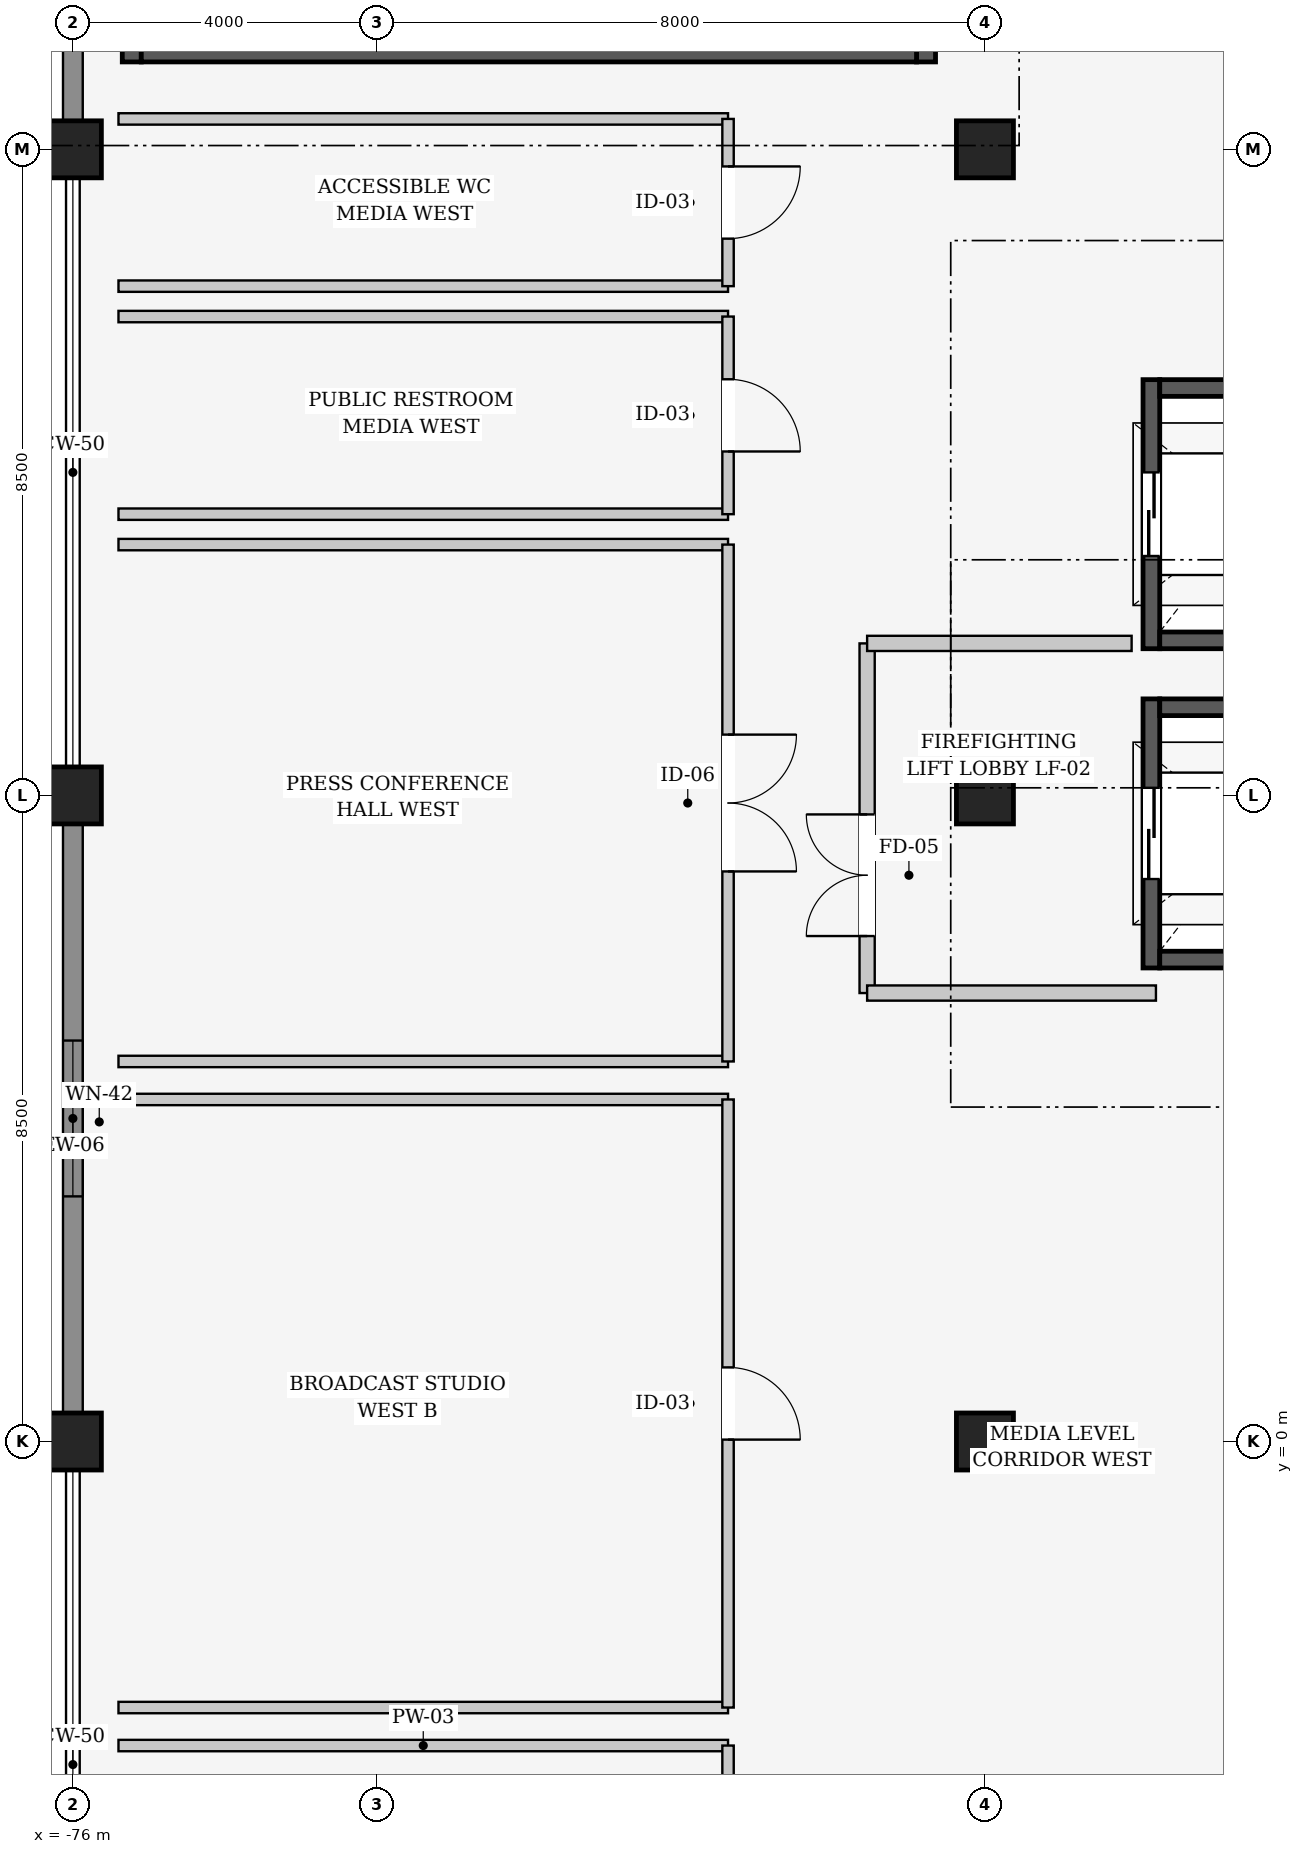
"""IFC4 building model, lengths in metres.
Left out: names, types, materials, properties, quantities, classifications, styles, units other than length and angle.
Written with IfcOpenShell. Run it as: python <this file> out.ifc"""

import sys

from ifc_helpers import new_model, si_unit, direction, frame, frame_2d, origin, origin_2d, place, context, subcontext, project, spatial, rectangle, extrude, element, fill, save


model = new_model("IFC4")
c1 = context("Model", 3, precision=1e-05, world=origin(), true_north=direction((0.0, 1.0)))
c2 = subcontext(c1, "Body", "Model", "MODEL_VIEW")
j1 = project(units=[si_unit("LENGTHUNIT", "METRE"), si_unit("PLANEANGLEUNIT", "RADIAN")], contexts=[c1])
p1 = place(None, origin())
s1 = spatial("IfcSite", under=j1, at=p1, CompositionType="ELEMENT")
p2 = place(p1, origin())
s2 = spatial("IfcBuilding", under=s1, at=p2, CompositionType="ELEMENT")
p3 = place(p2, frame((0.0, 0.0, 26.4)))
s3 = spatial("IfcBuildingStorey", under=s2, at=p3, CompositionType="ELEMENT", Elevation=26.4)
for number, where, z_axis, x_axis in (
    (1, (-76.0, 0.0, 0.0), (0.0, 0.0, 1.0), (1.0, 0.0, 0.0)),
    (2, (-76.0, 8.5, 0.0), (0.0, 0.0, 1.0), (1.0, 0.0, 0.0)),
    (3, (-76.0, 17.0, 0.0), (0.0, 0.0, 1.0), (1.0, 0.0, 0.0)),
    (4, (-64.0, 0.0, 0.0), (0.0, 0.0, 1.0), (1.0, 0.0, 0.0)),
    (5, (-64.0, 8.5, 0.0), (0.0, 0.0, 1.0), (1.0, 0.0, 0.0)),
    (6, (-64.0, 17.0, 0.0), (0.0, 0.0, 1.0), (1.0, 0.0, 0.0)),
):
    element("IfcColumn", number, at=place(p3, frame(where, z_axis=z_axis, x_axis=x_axis)), inside=s3, PredefinedType="COLUMN", context=c2, shape_type="SweptSolid", body=[
        extrude(rectangle(XDim=0.75, YDim=0.75, at=origin_2d()), origin(), (0.0, 0.0, 1.0), 5.4),
    ])
p4 = place(p3, frame((-76.0, 0.357, 0.0), z_axis=(0.0, 0.0, 1.0), x_axis=(0.0, 1.0, 0.0)))
e7 = element("IfcWall", 7, at=p4, inside=s3, PredefinedType="SOLIDWALL", context=c2, shape_type="SweptSolid", body=[
    extrude(rectangle(XDim=7.786, YDim=0.26, at=frame_2d((3.893, 0.0))), origin(), (0.0, 0.0, 1.0), 4.22),
])
p5 = place(p4, frame((2.868, 0.0, 0.95)))
e8 = element("IfcOpeningElement", 8, at=p5, cuts=e7, PredefinedType="OPENING", context=c2, shape_type="SweptSolid", body=[
    extrude(rectangle(XDim=2.05, YDim=2.25, at=frame_2d((1.025, 1.125))), frame((0.0, 0.14, 0.0), z_axis=(0.0, -1.0, 0.0), x_axis=(1.0, 0.0, 0.0)), (0.0, 0.0, 1.0), 0.28),
])
p6 = place(p3, frame((-76.0, 17.357, 0.0), z_axis=(0.0, 0.0, 1.0), x_axis=(0.0, 1.0, 0.0)))
e9 = element("IfcWall", 9, at=p6, inside=s3, PredefinedType="SOLIDWALL", context=c2, shape_type="SweptSolid", body=[
    extrude(rectangle(XDim=7.286, YDim=0.26, at=frame_2d((3.643, 0.0))), origin(), (0.0, 0.0, 1.0), 4.22),
])
p7 = place(p6, frame((2.518, 0.0, 0.95)))
e10 = element("IfcOpeningElement", 10, at=p7, cuts=e9, PredefinedType="OPENING", context=c2, shape_type="SweptSolid", body=[
    extrude(rectangle(XDim=2.25, YDim=2.25, at=frame_2d((1.125, 1.125))), frame((0.0, 0.14, 0.0), z_axis=(0.0, -1.0, 0.0), x_axis=(1.0, 0.0, 0.0)), (0.0, 0.0, 1.0), 0.28),
])
p8 = place(p3, frame((-75.225, 18.15, 0.0), z_axis=(0.0, 0.0, 1.0), x_axis=(0.0, 1.0, 0.0)))
e11 = element("IfcWall", 11, at=p8, inside=s3, PredefinedType="SHEAR", context=c2, shape_type="SweptSolid", body=[
    extrude(rectangle(XDim=5.7, YDim=0.25, at=frame_2d((2.85, 0.0))), origin(), (0.0, 0.0, 1.0), 3.6),
])
p9 = place(p3, frame((-64.775, 23.85, 0.0), z_axis=(0.0, 0.0, 1.0), x_axis=(0.0, -1.0, 0.0)))
e12 = element("IfcWall", 12, at=p9, inside=s3, PredefinedType="SHEAR", context=c2, shape_type="SweptSolid", body=[
    extrude(rectangle(XDim=5.7, YDim=0.25, at=frame_2d((2.85, 0.0))), origin(), (0.0, 0.0, 1.0), 3.6),
])
p10 = place(p9, frame((2.1, 0.0, 0.0)))
e13 = element("IfcOpeningElement", 13, at=p10, cuts=e12, PredefinedType="OPENING", context=c2, shape_type="SweptSolid", body=[
    extrude(rectangle(XDim=1.5, YDim=2.2, at=frame_2d((0.75, 1.1))), frame((0.0, 0.135, 0.0), z_axis=(0.0, -1.0, 0.0), x_axis=(1.0, 0.0, 0.0)), (0.0, 0.0, 1.0), 0.27),
])
p11 = place(p3, frame((-64.9, 18.275, 0.0), z_axis=(0.0, 0.0, 1.0), x_axis=(-1.0, 0.0, 0.0)))
e14 = element("IfcWall", 14, at=p11, inside=s3, PredefinedType="SHEAR", context=c2, shape_type="SweptSolid", body=[
    extrude(rectangle(XDim=10.2, YDim=0.25, at=frame_2d((5.1, 0.0))), origin(), (0.0, 0.0, 1.0), 3.6),
])
p12 = place(p3, frame((-61.81, 6.23, 0.0), z_axis=(0.0, 0.0, 1.0), x_axis=(0.0, 1.0, 0.0)))
e15 = element("IfcWall", 15, at=p12, inside=s3, PredefinedType="SHEAR", context=c2, shape_type="SweptSolid", body=[
    extrude(rectangle(XDim=3.54, YDim=0.22, at=frame_2d((1.77, 0.0))), origin(), (0.0, 0.0, 1.0), 6.8),
])
p13 = place(p12, frame((1.17, 0.0, 0.0)))
e16 = element("IfcOpeningElement", 16, at=p13, cuts=e15, PredefinedType="OPENING", context=c2, shape_type="SweptSolid", body=[
    extrude(rectangle(XDim=1.2, YDim=2.2, at=frame_2d((0.6, 1.1))), frame((0.0, 0.12, 0.0), z_axis=(0.0, -1.0, 0.0), x_axis=(1.0, 0.0, 0.0)), (0.0, 0.0, 1.0), 0.24),
])
for number, where, z_axis, x_axis in (
    (17, (-61.7, 9.66, 0.0), (0.0, 0.0, 1.0), (1.0, 0.0, 0.0)),
    (18, (-59.3, 6.34, 0.0), (0.0, 0.0, 1.0), (-1.0, 0.0, 0.0)),
):
    element("IfcWall", number, at=place(p3, frame(where, z_axis=z_axis, x_axis=x_axis)), inside=s3, PredefinedType="SHEAR", context=c2, shape_type="SweptSolid", body=[
        extrude(rectangle(XDim=2.4, YDim=0.22, at=frame_2d((1.2, 0.0))), origin(), (0.0, 0.0, 1.0), 6.8),
    ])
p14 = place(p3, frame((-61.81, 10.43, 0.0), z_axis=(0.0, 0.0, 1.0), x_axis=(0.0, 1.0, 0.0)))
e19 = element("IfcWall", 19, at=p14, inside=s3, PredefinedType="SHEAR", context=c2, shape_type="SweptSolid", body=[
    extrude(rectangle(XDim=3.54, YDim=0.22, at=frame_2d((1.77, 0.0))), origin(), (0.0, 0.0, 1.0), 6.8),
])
p15 = place(p14, frame((1.22, 0.0, 0.0)))
e20 = element("IfcOpeningElement", 20, at=p15, cuts=e19, PredefinedType="OPENING", context=c2, shape_type="SweptSolid", body=[
    extrude(rectangle(XDim=1.1, YDim=2.2, at=frame_2d((0.55, 1.1))), frame((0.0, 0.12, 0.0), z_axis=(0.0, -1.0, 0.0), x_axis=(1.0, 0.0, 0.0)), (0.0, 0.0, 1.0), 0.24),
])
for number, where, z_axis, x_axis in (
    (21, (-61.7, 13.86, 0.0), (0.0, 0.0, 1.0), (1.0, 0.0, 0.0)),
    (22, (-59.3, 10.54, 0.0), (0.0, 0.0, 1.0), (-1.0, 0.0, 0.0)),
):
    element("IfcWall", number, at=place(p3, frame(where, z_axis=z_axis, x_axis=x_axis)), inside=s3, PredefinedType="SHEAR", context=c2, shape_type="SweptSolid", body=[
        extrude(rectangle(XDim=2.4, YDim=0.22, at=frame_2d((1.2, 0.0))), origin(), (0.0, 0.0, 1.0), 6.8),
    ])
p16 = place(p3, frame((-65.55, 5.9, 0.0), z_axis=(0.0, 0.0, 1.0), x_axis=(0.0, 1.0, 0.0)))
e23 = element("IfcWall", 23, at=p16, inside=s3, PredefinedType="PARTITIONING", context=c2, shape_type="SweptSolid", body=[
    extrude(rectangle(XDim=4.6, YDim=0.2, at=frame_2d((2.3, 0.0))), origin(), (0.0, 0.0, 1.0), 4.205),
])
p17 = place(p16, frame((0.75, 0.0, 0.0)))
e24 = element("IfcOpeningElement", 24, at=p17, cuts=e23, PredefinedType="OPENING", context=c2, shape_type="SweptSolid", body=[
    extrude(rectangle(XDim=1.6, YDim=2.2, at=frame_2d((0.8, 1.1))), frame((0.0, 0.11, 0.0), z_axis=(0.0, -1.0, 0.0), x_axis=(1.0, 0.0, 0.0)), (0.0, 0.0, 1.0), 0.22),
])
p18 = place(p3, frame((-65.55, 10.5, 0.0), z_axis=(0.0, 0.0, 1.0), x_axis=(1.0, 0.0, 0.0)))
e25 = element("IfcWall", 25, at=p18, inside=s3, PredefinedType="PARTITIONING", context=c2, shape_type="SweptSolid", body=[
    extrude(rectangle(XDim=3.48, YDim=0.2, at=frame_2d((1.74, 0.0))), origin(), (0.0, 0.0, 1.0), 4.505),
])
p19 = place(p3, frame((-61.75, 5.9, 0.0), z_axis=(0.0, 0.0, 1.0), x_axis=(-1.0, 0.0, 0.0)))
e26 = element("IfcWall", 26, at=p19, inside=s3, PredefinedType="PARTITIONING", context=c2, shape_type="SweptSolid", body=[
    extrude(rectangle(XDim=3.8, YDim=0.2, at=frame_2d((1.9, 0.0))), origin(), (0.0, 0.0, 1.0), 4.505),
])
p20 = place(p3, frame((-75.4, -4.0, 0.0), z_axis=(0.0, 0.0, 1.0), x_axis=(1.0, 0.0, 0.0)))
e27 = element("IfcWall", 27, at=p20, inside=s3, PredefinedType="PARTITIONING", context=c2, shape_type="SweptSolid", body=[
    extrude(rectangle(XDim=8.02, YDim=0.15, at=frame_2d((4.01, 0.0))), origin(), (0.0, 0.0, 1.0), 4.842),
])
p21 = place(p3, frame((-67.38, -4.0, 0.0), z_axis=(0.0, 0.0, 1.0), x_axis=(0.0, -1.0, 0.0)))
e28 = element("IfcWall", 28, at=p21, inside=s3, PredefinedType="PARTITIONING", context=c2, shape_type="SweptSolid", body=[
    extrude(rectangle(XDim=9.0, YDim=0.15, at=frame_2d((4.5, 0.0))), origin(), (0.0, 0.0, 1.0), 4.205),
])
p22 = place(p21, frame((4.025, 0.0, 0.0)))
e29 = element("IfcOpeningElement", 29, at=p22, cuts=e28, PredefinedType="OPENING", context=c2, shape_type="SweptSolid", body=[
    extrude(rectangle(XDim=0.95, YDim=2.15, at=frame_2d((0.475, 1.075))), frame((0.0, 0.085, 0.0), z_axis=(0.0, -1.0, 0.0), x_axis=(1.0, 0.0, 0.0)), (0.0, 0.0, 1.0), 0.17),
])
p23 = place(p3, frame((-75.4, 4.5, 0.0), z_axis=(0.0, 0.0, 1.0), x_axis=(1.0, 0.0, 0.0)))
e30 = element("IfcWall", 30, at=p23, inside=s3, PredefinedType="PARTITIONING", context=c2, shape_type="SweptSolid", body=[
    extrude(rectangle(XDim=8.02, YDim=0.15, at=frame_2d((4.01, 0.0))), origin(), (0.0, 0.0, 1.0), 4.842),
])
p24 = place(p3, frame((-67.38, -3.5, 0.0), z_axis=(0.0, 0.0, 1.0), x_axis=(-1.0, 0.0, 0.0)))
e31 = element("IfcWall", 31, at=p24, inside=s3, PredefinedType="PARTITIONING", context=c2, shape_type="SweptSolid", body=[
    extrude(rectangle(XDim=8.02, YDim=0.15, at=frame_2d((4.01, 0.0))), origin(), (0.0, 0.0, 1.0), 5.04),
])
p25 = place(p3, frame((-67.38, 4.5, 0.0), z_axis=(0.0, 0.0, 1.0), x_axis=(0.0, -1.0, 0.0)))
e32 = element("IfcWall", 32, at=p25, inside=s3, PredefinedType="PARTITIONING", context=c2, shape_type="SweptSolid", body=[
    extrude(rectangle(XDim=8.0, YDim=0.15, at=frame_2d((4.0, 0.0))), origin(), (0.0, 0.0, 1.0), 4.205),
])
p26 = place(p25, frame((3.525, 0.0, 0.0)))
e33 = element("IfcOpeningElement", 33, at=p26, cuts=e32, PredefinedType="OPENING", context=c2, shape_type="SweptSolid", body=[
    extrude(rectangle(XDim=0.95, YDim=2.15, at=frame_2d((0.475, 1.075))), frame((0.0, 0.085, 0.0), z_axis=(0.0, -1.0, 0.0), x_axis=(1.0, 0.0, 0.0)), (0.0, 0.0, 1.0), 0.17),
])
for number, where, z_axis, x_axis in (
    (34, (-75.4, 11.8, 0.0), (0.0, 0.0, 1.0), (1.0, 0.0, 0.0)),
    (35, (-67.38, 5.0, 0.0), (0.0, 0.0, 1.0), (-1.0, 0.0, 0.0)),
):
    element("IfcWall", number, at=place(p3, frame(where, z_axis=z_axis, x_axis=x_axis)), inside=s3, PredefinedType="PARTITIONING", context=c2, shape_type="SweptSolid", body=[
        extrude(rectangle(XDim=8.02, YDim=0.15, at=frame_2d((4.01, 0.0))), origin(), (0.0, 0.0, 1.0), 5.04),
    ])
p27 = place(p3, frame((-67.38, 11.8, 0.0), z_axis=(0.0, 0.0, 1.0), x_axis=(0.0, -1.0, 0.0)))
e36 = element("IfcWall", 36, at=p27, inside=s3, PredefinedType="PARTITIONING", context=c2, shape_type="SweptSolid", body=[
    extrude(rectangle(XDim=6.8, YDim=0.15, at=frame_2d((3.4, 0.0))), origin(), (0.0, 0.0, 1.0), 4.205),
])
p28 = place(p27, frame((2.5, 0.0, 0.0)))
e37 = element("IfcOpeningElement", 37, at=p28, cuts=e36, PredefinedType="OPENING", context=c2, shape_type="SweptSolid", body=[
    extrude(rectangle(XDim=1.8, YDim=2.2, at=frame_2d((0.9, 1.1))), frame((0.0, 0.085, 0.0), z_axis=(0.0, -1.0, 0.0), x_axis=(1.0, 0.0, 0.0)), (0.0, 0.0, 1.0), 0.17),
])
for number, where, z_axis, x_axis in (
    (38, (-75.4, 14.8, 0.0), (0.0, 0.0, 1.0), (1.0, 0.0, 0.0)),
    (39, (-67.38, 12.2, 0.0), (0.0, 0.0, 1.0), (-1.0, 0.0, 0.0)),
):
    element("IfcWall", number, at=place(p3, frame(where, z_axis=z_axis, x_axis=x_axis)), inside=s3, PredefinedType="PARTITIONING", context=c2, shape_type="SweptSolid", body=[
        extrude(rectangle(XDim=8.02, YDim=0.15, at=frame_2d((4.01, 0.0))), origin(), (0.0, 0.0, 1.0), 5.04),
    ])
p29 = place(p3, frame((-67.38, 14.8, 0.0), z_axis=(0.0, 0.0, 1.0), x_axis=(0.0, -1.0, 0.0)))
e40 = element("IfcWall", 40, at=p29, inside=s3, PredefinedType="PARTITIONING", context=c2, shape_type="SweptSolid", body=[
    extrude(rectangle(XDim=2.6, YDim=0.15, at=frame_2d((1.3, 0.0))), origin(), (0.0, 0.0, 1.0), 4.842),
])
p30 = place(p29, frame((0.825, 0.0, 0.0)))
e41 = element("IfcOpeningElement", 41, at=p30, cuts=e40, PredefinedType="OPENING", context=c2, shape_type="SweptSolid", body=[
    extrude(rectangle(XDim=0.95, YDim=2.15, at=frame_2d((0.475, 1.075))), frame((0.0, 0.085, 0.0), z_axis=(0.0, -1.0, 0.0), x_axis=(1.0, 0.0, 0.0)), (0.0, 0.0, 1.0), 0.17),
])
p31 = place(p3, frame((-75.4, 17.4, 0.0), z_axis=(0.0, 0.0, 1.0), x_axis=(1.0, 0.0, 0.0)))
e42 = element("IfcWall", 42, at=p31, inside=s3, PredefinedType="PARTITIONING", context=c2, shape_type="SweptSolid", body=[
    extrude(rectangle(XDim=8.02, YDim=0.15, at=frame_2d((4.01, 0.0))), origin(), (0.0, 0.0, 1.0), 4.205),
])
p32 = place(p3, frame((-67.38, 15.2, 0.0), z_axis=(0.0, 0.0, 1.0), x_axis=(-1.0, 0.0, 0.0)))
e43 = element("IfcWall", 43, at=p32, inside=s3, PredefinedType="PARTITIONING", context=c2, shape_type="SweptSolid", body=[
    extrude(rectangle(XDim=8.02, YDim=0.15, at=frame_2d((4.01, 0.0))), origin(), (0.0, 0.0, 1.0), 5.04),
])
p33 = place(p3, frame((-67.38, 17.4, 0.0), z_axis=(0.0, 0.0, 1.0), x_axis=(0.0, -1.0, 0.0)))
e44 = element("IfcWall", 44, at=p33, inside=s3, PredefinedType="PARTITIONING", context=c2, shape_type="SweptSolid", body=[
    extrude(rectangle(XDim=2.2, YDim=0.15, at=frame_2d((1.1, 0.0))), origin(), (0.0, 0.0, 1.0), 4.205),
])
p34 = place(p33, frame((0.625, 0.0, 0.0)))
e45 = element("IfcOpeningElement", 45, at=p34, cuts=e44, PredefinedType="OPENING", context=c2, shape_type="SweptSolid", body=[
    extrude(rectangle(XDim=0.95, YDim=2.15, at=frame_2d((0.475, 1.075))), frame((0.0, 0.085, 0.0), z_axis=(0.0, -1.0, 0.0), x_axis=(1.0, 0.0, 0.0)), (0.0, 0.0, 1.0), 0.17),
])
p35 = place(p5, origin())
e46 = element("IfcWindow", 46, at=p35, inside=s3, PartitioningType="SINGLE_PANEL", PredefinedType="WINDOW", context=c2, shape_type="SweptSolid", body=[
    extrude(rectangle(XDim=2.05, YDim=2.25, at=frame_2d((1.025, 1.125))), frame((0.0, 0.03, 0.0), z_axis=(0.0, -1.0, 0.0), x_axis=(1.0, 0.0, 0.0)), (0.0, 0.0, 1.0), 0.06),
])
fill(e8, e46)
p36 = place(p13, origin())
e47 = element("IfcDoor", 47, at=p36, inside=s3, OperationType="SLIDING_TO_LEFT", PredefinedType="DOOR", context=c2, shape_type="SweptSolid", body=[
    extrude(rectangle(XDim=1.2, YDim=2.2, at=frame_2d((0.6, 1.1))), frame((0.0, 0.025, 0.0), z_axis=(0.0, -1.0, 0.0), x_axis=(1.0, 0.0, 0.0)), (0.0, 0.0, 1.0), 0.05),
])
fill(e16, e47)
p37 = place(p15, origin())
e48 = element("IfcDoor", 48, at=p37, inside=s3, OperationType="SLIDING_TO_LEFT", PredefinedType="DOOR", context=c2, shape_type="SweptSolid", body=[
    extrude(rectangle(XDim=1.1, YDim=2.2, at=frame_2d((0.55, 1.1))), frame((0.0, 0.025, 0.0), z_axis=(0.0, -1.0, 0.0), x_axis=(1.0, 0.0, 0.0)), (0.0, 0.0, 1.0), 0.05),
])
fill(e20, e48)
p38 = place(p17, origin())
e49 = element("IfcDoor", 49, at=p38, inside=s3, OperationType="DOUBLE_DOOR_SINGLE_SWING", PredefinedType="DOOR", context=c2, shape_type="SweptSolid", body=[
    extrude(rectangle(XDim=1.6, YDim=2.2, at=frame_2d((0.8, 1.1))), frame((0.0, 0.025, 0.0), z_axis=(0.0, -1.0, 0.0), x_axis=(1.0, 0.0, 0.0)), (0.0, 0.0, 1.0), 0.05),
])
fill(e24, e49)
p39 = place(p26, origin())
e50 = element("IfcDoor", 50, at=p39, inside=s3, OperationType="SINGLE_SWING_RIGHT", PredefinedType="DOOR", context=c2, shape_type="SweptSolid", body=[
    extrude(rectangle(XDim=0.95, YDim=2.15, at=frame_2d((0.475, 1.075))), frame((0.0, 0.025, 0.0), z_axis=(0.0, -1.0, 0.0), x_axis=(1.0, 0.0, 0.0)), (0.0, 0.0, 1.0), 0.05),
])
fill(e33, e50)
p40 = place(p28, origin())
e51 = element("IfcDoor", 51, at=p40, inside=s3, OperationType="DOUBLE_DOOR_SINGLE_SWING", PredefinedType="DOOR", context=c2, shape_type="SweptSolid", body=[
    extrude(rectangle(XDim=1.8, YDim=2.2, at=frame_2d((0.9, 1.1))), frame((0.0, 0.025, 0.0), z_axis=(0.0, -1.0, 0.0), x_axis=(1.0, 0.0, 0.0)), (0.0, 0.0, 1.0), 0.05),
])
fill(e37, e51)
p41 = place(p30, origin())
e52 = element("IfcDoor", 52, at=p41, inside=s3, OperationType="SINGLE_SWING_RIGHT", PredefinedType="DOOR", context=c2, shape_type="SweptSolid", body=[
    extrude(rectangle(XDim=0.95, YDim=2.15, at=frame_2d((0.475, 1.075))), frame((0.0, 0.025, 0.0), z_axis=(0.0, -1.0, 0.0), x_axis=(1.0, 0.0, 0.0)), (0.0, 0.0, 1.0), 0.05),
])
fill(e41, e52)
p42 = place(p34, origin())
e53 = element("IfcDoor", 53, at=p42, inside=s3, OperationType="SINGLE_SWING_LEFT", PredefinedType="DOOR", context=c2, shape_type="SweptSolid", body=[
    extrude(rectangle(XDim=0.95, YDim=2.15, at=frame_2d((0.475, 1.075))), frame((0.0, 0.025, 0.0), z_axis=(0.0, -1.0, 0.0), x_axis=(1.0, 0.0, 0.0)), (0.0, 0.0, 1.0), 0.05),
])
fill(e45, e53)
save(model, sys.argv[1])
